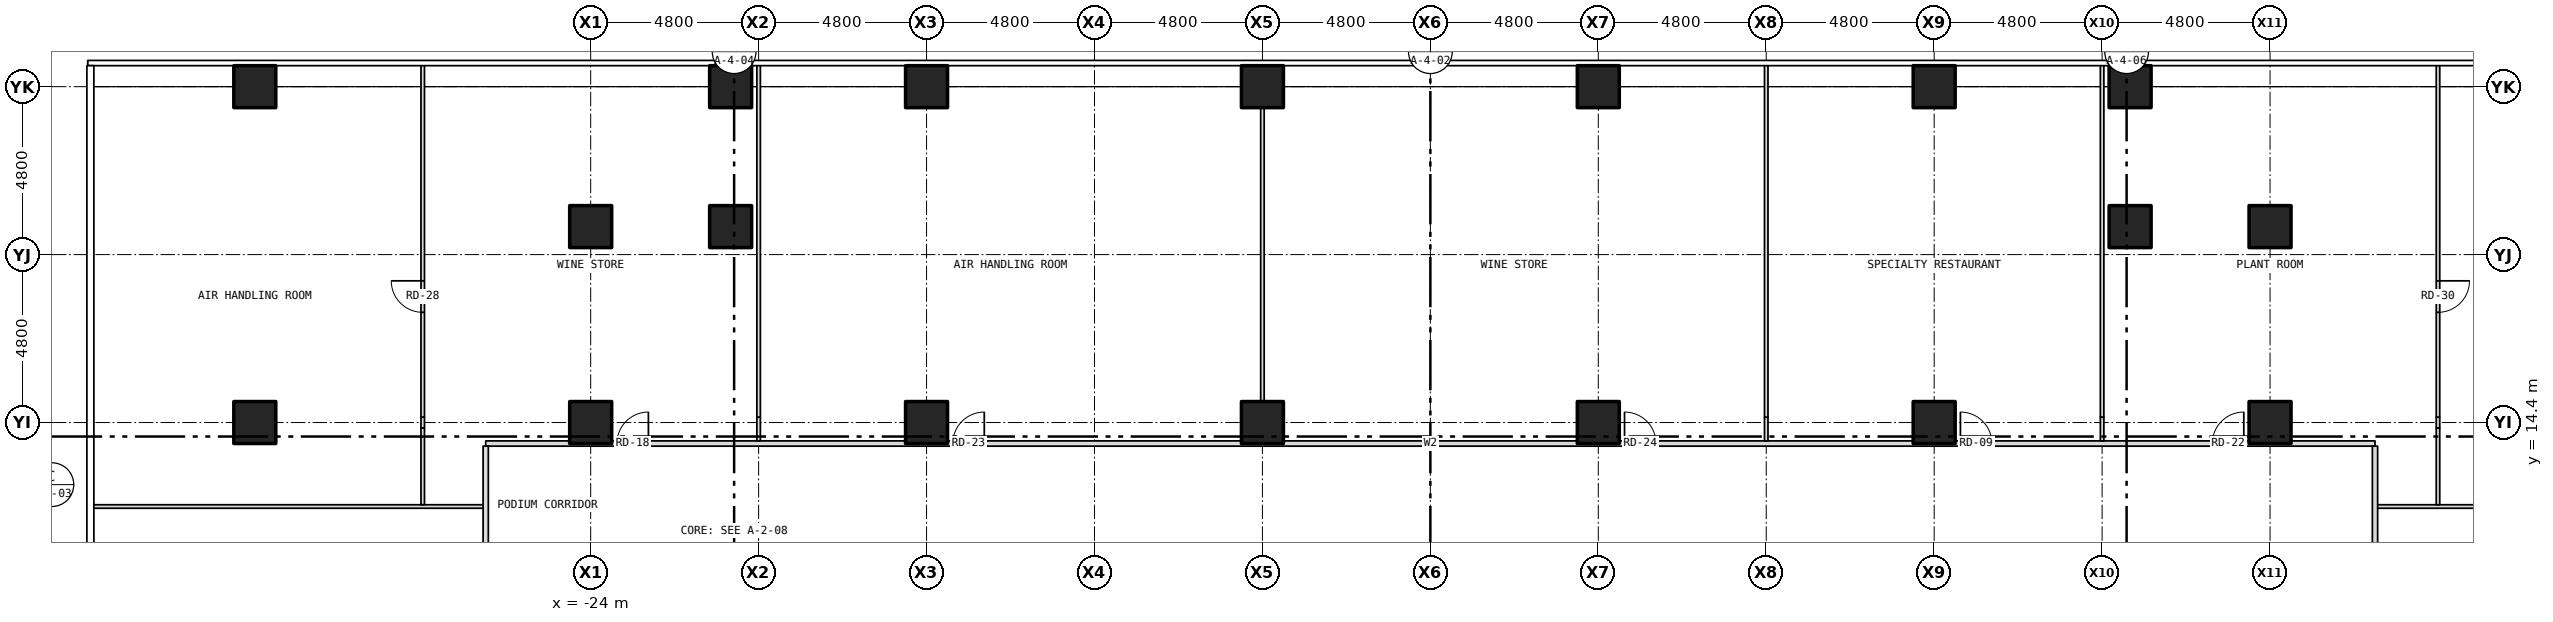
"""IFC4 building model, lengths in metres.
Left out: names, types, materials, properties, quantities, classifications, styles, units other than length and angle.
Written with IfcOpenShell. Run it as: python <this file> out.ifc"""

import sys

from ifc_helpers import new_model, si_unit, direction, frame, frame_2d, origin, origin_2d, place, context, subcontext, project, spatial, rectangle, hollow_rectangle, extrude, element, fill, save


model = new_model("IFC4")
c1 = context("Model", 3, precision=1e-05, world=origin(), true_north=direction((0.0, 1.0)))
c2 = subcontext(c1, "Body", "Model", "MODEL_VIEW")
j1 = project(units=[si_unit("LENGTHUNIT", "METRE"), si_unit("PLANEANGLEUNIT", "RADIAN")], contexts=[c1])
p1 = place(None, origin())
s1 = spatial("IfcSite", under=j1, at=p1, CompositionType="ELEMENT")
p2 = place(p1, origin())
s2 = spatial("IfcBuilding", under=s1, at=p2, CompositionType="ELEMENT")
p3 = place(p2, frame((0.0, 0.0, 29.0)))
s3 = spatial("IfcBuildingStorey", under=s2, at=p3, CompositionType="ELEMENT", Elevation=29.0)
for number, where, z_axis, x_axis in (
    (1, (-33.6, 14.4, -0.2), (0.0, 0.0, 1.0), (1.0, 0.0, 0.0)),
    (2, (-33.6, 24.0, -0.2), (0.0, 0.0, 1.0), (1.0, 0.0, 0.0)),
    (3, (-20.0, 24.0, -0.2), (0.0, 0.0, 1.0), (1.0, 0.0, 0.0)),
    (4, (-14.4, 24.0, -0.2), (0.0, 0.0, 1.0), (1.0, 0.0, 0.0)),
    (5, (-4.8, 24.0, -0.2), (0.0, 0.0, 1.0), (1.0, 0.0, 0.0)),
    (6, (4.8, 24.0, -0.2), (0.0, 0.0, 1.0), (1.0, 0.0, 0.0)),
    (7, (14.4, 24.0, -0.2), (0.0, 0.0, 1.0), (1.0, 0.0, 0.0)),
    (8, (20.0, 24.0, -0.2), (0.0, 0.0, 1.0), (1.0, 0.0, 0.0)),
    (9, (-24.0, 14.4, -0.2), (0.0, 0.0, 1.0), (1.0, 0.0, 0.0)),
    (10, (-24.0, 20.0, -0.2), (0.0, 0.0, 1.0), (1.0, 0.0, 0.0)),
    (11, (-20.0, 20.0, -0.2), (0.0, 0.0, 1.0), (1.0, 0.0, 0.0)),
    (12, (-14.4, 14.4, -0.2), (0.0, 0.0, 1.0), (1.0, 0.0, 0.0)),
    (13, (-4.8, 14.4, -0.2), (0.0, 0.0, 1.0), (1.0, 0.0, 0.0)),
    (14, (4.8, 14.4, -0.2), (0.0, 0.0, 1.0), (1.0, 0.0, 0.0)),
    (15, (14.4, 14.4, -0.2), (0.0, 0.0, 1.0), (1.0, 0.0, 0.0)),
    (16, (20.0, 20.0, -0.2), (0.0, 0.0, 1.0), (1.0, 0.0, 0.0)),
    (17, (24.0, 14.4, -0.2), (0.0, 0.0, 1.0), (1.0, 0.0, 0.0)),
    (18, (24.0, 20.0, -0.2), (0.0, 0.0, 1.0), (1.0, 0.0, 0.0)),
):
    element("IfcColumn", number, at=place(p3, frame(where, z_axis=z_axis, x_axis=x_axis)), inside=s3, PredefinedType="COLUMN", context=c2, shape_type="SweptSolid", body=[
        extrude(hollow_rectangle(XDim=1.2, YDim=1.2, WallThickness=0.07, at=origin_2d()), origin(), (0.0, 0.0, 1.0), 4.4),
    ])
for number, where, z_axis, x_axis in (
    (19, (-38.28, 12.0, 0.0), (0.0, 0.0, 1.0), (1.0, 0.0, 0.0)),
    (20, (27.0, 12.0, 0.0), (0.0, 0.0, 1.0), (1.0, 0.0, 0.0)),
):
    element("IfcWall", number, at=place(p3, frame(where, z_axis=z_axis, x_axis=x_axis)), inside=s3, PredefinedType="PARTITIONING", context=c2, shape_type="SweptSolid", body=[
        extrude(rectangle(XDim=11.28, YDim=0.1, at=frame_2d((5.64, 0.0))), origin(), (0.0, 0.0, 1.0), 4.2),
    ])
p4 = place(p3, frame((-27.0, 13.8, 0.0), z_axis=(0.0, 0.0, 1.0), x_axis=(1.0, 0.0, 0.0)))
e21 = element("IfcWall", 21, at=p4, inside=s3, PredefinedType="PARTITIONING", context=c2, shape_type="SweptSolid", body=[
    extrude(rectangle(XDim=54.0, YDim=0.15, at=frame_2d((27.0, 0.0))), origin(), (0.0, 0.0, 1.0), 4.2),
])
p5 = place(p4, frame((42.15, 0.0, 0.0)))
e22 = element("IfcOpeningElement", 22, at=p5, cuts=e21, PredefinedType="OPENING", context=c2, shape_type="SweptSolid", body=[
    extrude(rectangle(XDim=0.9, YDim=2.1, at=frame_2d((0.45, 1.05))), frame((0.0, 0.087, 0.0), z_axis=(0.0, -1.0, 0.0), x_axis=(1.0, 0.0, 0.0)), (0.0, 0.0, 1.0), 0.174),
])
p6 = place(p4, frame((3.75, 0.0, 0.0)))
e23 = element("IfcOpeningElement", 23, at=p6, cuts=e21, PredefinedType="OPENING", context=c2, shape_type="SweptSolid", body=[
    extrude(rectangle(XDim=0.9, YDim=2.1, at=frame_2d((0.45, 1.05))), frame((0.0, 0.087, 0.0), z_axis=(0.0, -1.0, 0.0), x_axis=(1.0, 0.0, 0.0)), (0.0, 0.0, 1.0), 0.174),
])
p7 = place(p4, frame((49.35, 0.0, 0.0)))
e24 = element("IfcOpeningElement", 24, at=p7, cuts=e21, PredefinedType="OPENING", context=c2, shape_type="SweptSolid", body=[
    extrude(rectangle(XDim=0.9, YDim=2.1, at=frame_2d((0.45, 1.05))), frame((0.0, 0.087, 0.0), z_axis=(0.0, -1.0, 0.0), x_axis=(1.0, 0.0, 0.0)), (0.0, 0.0, 1.0), 0.174),
])
p8 = place(p4, frame((13.35, 0.0, 0.0)))
e25 = element("IfcOpeningElement", 25, at=p8, cuts=e21, PredefinedType="OPENING", context=c2, shape_type="SweptSolid", body=[
    extrude(rectangle(XDim=0.9, YDim=2.1, at=frame_2d((0.45, 1.05))), frame((0.0, 0.087, 0.0), z_axis=(0.0, -1.0, 0.0), x_axis=(1.0, 0.0, 0.0)), (0.0, 0.0, 1.0), 0.174),
])
p9 = place(p4, frame((32.55, 0.0, 0.0)))
e26 = element("IfcOpeningElement", 26, at=p9, cuts=e21, PredefinedType="OPENING", context=c2, shape_type="SweptSolid", body=[
    extrude(rectangle(XDim=0.9, YDim=2.1, at=frame_2d((0.45, 1.05))), frame((0.0, 0.087, 0.0), z_axis=(0.0, -1.0, 0.0), x_axis=(1.0, 0.0, 0.0)), (0.0, 0.0, 1.0), 0.174),
])
p10 = place(p3, frame((-28.8, 12.05, 0.0), z_axis=(0.0, 0.0, 1.0), x_axis=(0.0, 1.0, 0.0)))
e27 = element("IfcWall", 27, at=p10, inside=s3, PredefinedType="PARTITIONING", context=c2, shape_type="SweptSolid", body=[
    extrude(rectangle(XDim=2.196, YDim=0.1, at=frame_2d((1.098, 0.0))), origin(), (0.0, 0.0, 1.0), 3.583),
])
p11 = place(p3, frame((-28.8, 14.246, 0.0), z_axis=(0.0, 0.0, 1.0), x_axis=(0.0, 1.0, 0.0)))
e28 = element("IfcWall", 28, at=p11, inside=s3, PredefinedType="PARTITIONING", context=c2, shape_type="SweptSolid", body=[
    extrude(rectangle(XDim=0.308, YDim=0.1, at=frame_2d((0.154, 0.0))), origin(), (0.0, 0.0, 1.0), 4.2),
])
p12 = place(p3, frame((-28.8, 14.554, 0.0), z_axis=(0.0, 0.0, 1.0), x_axis=(0.0, 1.0, 0.0)))
e29 = element("IfcWall", 29, at=p12, inside=s3, PredefinedType="PARTITIONING", context=c2, shape_type="SweptSolid", body=[
    extrude(rectangle(XDim=10.076, YDim=0.1, at=frame_2d((5.038, 0.0))), origin(), (0.0, 0.0, 1.0), 3.583),
])
p13 = place(p12, frame((2.996, 0.0, 0.0)))
e30 = element("IfcOpeningElement", 30, at=p13, cuts=e29, PredefinedType="OPENING", context=c2, shape_type="SweptSolid", body=[
    extrude(rectangle(XDim=0.9, YDim=2.1, at=frame_2d((0.45, 1.05))), frame((0.0, 0.062, 0.0), z_axis=(0.0, -1.0, 0.0), x_axis=(1.0, 0.0, 0.0)), (0.0, 0.0, 1.0), 0.124),
])
p14 = place(p3, frame((-27.0, -13.725, 0.0), z_axis=(0.0, 0.0, 1.0), x_axis=(0.0, 1.0, 0.0)))
e31 = element("IfcWall", 31, at=p14, inside=s3, PredefinedType="PARTITIONING", context=c2, shape_type="SweptSolid", body=[
    extrude(rectangle(XDim=27.45, YDim=0.15, at=frame_2d((13.725, 0.0))), origin(), (0.0, 0.0, 1.0), 4.2),
])
p15 = place(p14, frame((7.275, 0.0, 0.0)))
e32 = element("IfcOpeningElement", 32, at=p15, cuts=e31, PredefinedType="OPENING", context=c2, shape_type="SweptSolid", body=[
    extrude(rectangle(XDim=0.9, YDim=2.1, at=frame_2d((0.45, 1.05))), frame((0.0, 0.087, 0.0), z_axis=(0.0, -1.0, 0.0), x_axis=(1.0, 0.0, 0.0)), (0.0, 0.0, 1.0), 0.174),
])
p16 = place(p14, frame((19.275, 0.0, 0.0)))
e33 = element("IfcOpeningElement", 33, at=p16, cuts=e31, PredefinedType="OPENING", context=c2, shape_type="SweptSolid", body=[
    extrude(rectangle(XDim=0.9, YDim=2.1, at=frame_2d((0.45, 1.05))), frame((0.0, 0.087, 0.0), z_axis=(0.0, -1.0, 0.0), x_axis=(1.0, 0.0, 0.0)), (0.0, 0.0, 1.0), 0.174),
])
p17 = place(p3, frame((-19.2, 13.875, 0.0), z_axis=(0.0, 0.0, 1.0), x_axis=(0.0, 1.0, 0.0)))
e34 = element("IfcWall", 34, at=p17, inside=s3, PredefinedType="PARTITIONING", context=c2, shape_type="SweptSolid", body=[
    extrude(rectangle(XDim=0.679, YDim=0.1, at=frame_2d((0.339, 0.0))), origin(), (0.0, 0.0, 1.0), 4.2),
])
p18 = place(p3, frame((-19.2, 14.554, 0.0), z_axis=(0.0, 0.0, 1.0), x_axis=(0.0, 1.0, 0.0)))
e35 = element("IfcWall", 35, at=p18, inside=s3, PredefinedType="PARTITIONING", context=c2, shape_type="SweptSolid", body=[
    extrude(rectangle(XDim=10.076, YDim=0.1, at=frame_2d((5.038, 0.0))), origin(), (0.0, 0.0, 1.0), 3.583),
])
p19 = place(p3, frame((-4.8, 13.875, 0.0), z_axis=(0.0, 0.0, 1.0), x_axis=(0.0, 1.0, 0.0)))
e36 = element("IfcWall", 36, at=p19, inside=s3, PredefinedType="PARTITIONING", context=c2, shape_type="SweptSolid", body=[
    extrude(rectangle(XDim=1.125, YDim=0.1, at=frame_2d((0.562, 0.0))), origin(), (0.0, 0.0, 1.0), 4.2),
])
p20 = place(p3, frame((-4.8, 15.0, 0.0), z_axis=(0.0, 0.0, 1.0), x_axis=(0.0, 1.0, 0.0)))
e37 = element("IfcWall", 37, at=p20, inside=s3, PredefinedType="PARTITIONING", context=c2, shape_type="SweptSolid", body=[
    extrude(rectangle(XDim=8.4, YDim=0.1, at=frame_2d((4.2, 0.0))), origin(), (0.0, 0.0, 1.0), 3.273),
])
p21 = place(p3, frame((-4.8, 23.4, 0.0), z_axis=(0.0, 0.0, 1.0), x_axis=(0.0, 1.0, 0.0)))
e38 = element("IfcWall", 38, at=p21, inside=s3, PredefinedType="PARTITIONING", context=c2, shape_type="SweptSolid", body=[
    extrude(rectangle(XDim=0.48, YDim=0.1, at=frame_2d((0.24, 0.0))), origin(), (0.0, 0.0, 1.0), 4.2),
])
p22 = place(p3, frame((9.6, 13.875, 0.0), z_axis=(0.0, 0.0, 1.0), x_axis=(0.0, 1.0, 0.0)))
e39 = element("IfcWall", 39, at=p22, inside=s3, PredefinedType="PARTITIONING", context=c2, shape_type="SweptSolid", body=[
    extrude(rectangle(XDim=0.679, YDim=0.1, at=frame_2d((0.339, 0.0))), origin(), (0.0, 0.0, 1.0), 4.2),
])
p23 = place(p3, frame((9.6, 14.554, 0.0), z_axis=(0.0, 0.0, 1.0), x_axis=(0.0, 1.0, 0.0)))
e40 = element("IfcWall", 40, at=p23, inside=s3, PredefinedType="PARTITIONING", context=c2, shape_type="SweptSolid", body=[
    extrude(rectangle(XDim=10.076, YDim=0.1, at=frame_2d((5.038, 0.0))), origin(), (0.0, 0.0, 1.0), 3.583),
])
p24 = place(p3, frame((19.2, 13.875, 0.0), z_axis=(0.0, 0.0, 1.0), x_axis=(0.0, 1.0, 0.0)))
e41 = element("IfcWall", 41, at=p24, inside=s3, PredefinedType="PARTITIONING", context=c2, shape_type="SweptSolid", body=[
    extrude(rectangle(XDim=0.679, YDim=0.1, at=frame_2d((0.339, 0.0))), origin(), (0.0, 0.0, 1.0), 4.2),
])
p25 = place(p3, frame((19.2, 14.554, 0.0), z_axis=(0.0, 0.0, 1.0), x_axis=(0.0, 1.0, 0.0)))
e42 = element("IfcWall", 42, at=p25, inside=s3, PredefinedType="PARTITIONING", context=c2, shape_type="SweptSolid", body=[
    extrude(rectangle(XDim=10.076, YDim=0.1, at=frame_2d((5.038, 0.0))), origin(), (0.0, 0.0, 1.0), 3.583),
])
p26 = place(p3, frame((27.0, -13.725, 0.0), z_axis=(0.0, 0.0, 1.0), x_axis=(0.0, 1.0, 0.0)))
e43 = element("IfcWall", 43, at=p26, inside=s3, PredefinedType="PARTITIONING", context=c2, shape_type="SweptSolid", body=[
    extrude(rectangle(XDim=27.45, YDim=0.15, at=frame_2d((13.725, 0.0))), origin(), (0.0, 0.0, 1.0), 4.2),
])
p27 = place(p26, frame((7.275, 0.0, 0.0)))
e44 = element("IfcOpeningElement", 44, at=p27, cuts=e43, PredefinedType="OPENING", context=c2, shape_type="SweptSolid", body=[
    extrude(rectangle(XDim=0.9, YDim=2.1, at=frame_2d((0.45, 1.05))), frame((0.0, 0.087, 0.0), z_axis=(0.0, -1.0, 0.0), x_axis=(1.0, 0.0, 0.0)), (0.0, 0.0, 1.0), 0.174),
])
p28 = place(p26, frame((19.275, 0.0, 0.0)))
e45 = element("IfcOpeningElement", 45, at=p28, cuts=e43, PredefinedType="OPENING", context=c2, shape_type="SweptSolid", body=[
    extrude(rectangle(XDim=0.9, YDim=2.1, at=frame_2d((0.45, 1.05))), frame((0.0, 0.087, 0.0), z_axis=(0.0, -1.0, 0.0), x_axis=(1.0, 0.0, 0.0)), (0.0, 0.0, 1.0), 0.174),
])
p29 = place(p3, frame((28.8, 12.05, 0.0), z_axis=(0.0, 0.0, 1.0), x_axis=(0.0, 1.0, 0.0)))
e46 = element("IfcWall", 46, at=p29, inside=s3, PredefinedType="PARTITIONING", context=c2, shape_type="SweptSolid", body=[
    extrude(rectangle(XDim=2.196, YDim=0.1, at=frame_2d((1.098, 0.0))), origin(), (0.0, 0.0, 1.0), 3.583),
])
p30 = place(p3, frame((28.8, 14.246, 0.0), z_axis=(0.0, 0.0, 1.0), x_axis=(0.0, 1.0, 0.0)))
e47 = element("IfcWall", 47, at=p30, inside=s3, PredefinedType="PARTITIONING", context=c2, shape_type="SweptSolid", body=[
    extrude(rectangle(XDim=0.308, YDim=0.1, at=frame_2d((0.154, 0.0))), origin(), (0.0, 0.0, 1.0), 4.2),
])
p31 = place(p3, frame((28.8, 14.554, 0.0), z_axis=(0.0, 0.0, 1.0), x_axis=(0.0, 1.0, 0.0)))
e48 = element("IfcWall", 48, at=p31, inside=s3, PredefinedType="PARTITIONING", context=c2, shape_type="SweptSolid", body=[
    extrude(rectangle(XDim=10.076, YDim=0.1, at=frame_2d((5.038, 0.0))), origin(), (0.0, 0.0, 1.0), 3.583),
])
p32 = place(p31, frame((2.996, 0.0, 0.0)))
e49 = element("IfcOpeningElement", 49, at=p32, cuts=e48, PredefinedType="OPENING", context=c2, shape_type="SweptSolid", body=[
    extrude(rectangle(XDim=0.9, YDim=2.1, at=frame_2d((0.45, 1.05))), frame((0.0, 0.062, 0.0), z_axis=(0.0, -1.0, 0.0), x_axis=(1.0, 0.0, 0.0)), (0.0, 0.0, 1.0), 0.124),
])
p33 = place(p5, origin())
e50 = element("IfcDoor", 50, at=p33, inside=s3, OperationType="SINGLE_SWING_LEFT", PredefinedType="DOOR", context=c2, shape_type="SweptSolid", body=[
    extrude(rectangle(XDim=0.9, YDim=2.1, at=frame_2d((0.45, 1.05))), frame((0.0, 0.025, 0.0), z_axis=(0.0, -1.0, 0.0), x_axis=(1.0, 0.0, 0.0)), (0.0, 0.0, 1.0), 0.05),
])
fill(e22, e50)
p34 = place(p6, origin())
e51 = element("IfcDoor", 51, at=p34, inside=s3, OperationType="SINGLE_SWING_RIGHT", PredefinedType="DOOR", context=c2, shape_type="SweptSolid", body=[
    extrude(rectangle(XDim=0.9, YDim=2.1, at=frame_2d((0.45, 1.05))), frame((0.0, 0.025, 0.0), z_axis=(0.0, -1.0, 0.0), x_axis=(1.0, 0.0, 0.0)), (0.0, 0.0, 1.0), 0.05),
])
fill(e23, e51)
p35 = place(p7, origin())
e52 = element("IfcDoor", 52, at=p35, inside=s3, OperationType="SINGLE_SWING_RIGHT", PredefinedType="DOOR", context=c2, shape_type="SweptSolid", body=[
    extrude(rectangle(XDim=0.9, YDim=2.1, at=frame_2d((0.45, 1.05))), frame((0.0, 0.025, 0.0), z_axis=(0.0, -1.0, 0.0), x_axis=(1.0, 0.0, 0.0)), (0.0, 0.0, 1.0), 0.05),
])
fill(e24, e52)
p36 = place(p8, origin())
e53 = element("IfcDoor", 53, at=p36, inside=s3, OperationType="SINGLE_SWING_RIGHT", PredefinedType="DOOR", context=c2, shape_type="SweptSolid", body=[
    extrude(rectangle(XDim=0.9, YDim=2.1, at=frame_2d((0.45, 1.05))), frame((0.0, 0.025, 0.0), z_axis=(0.0, -1.0, 0.0), x_axis=(1.0, 0.0, 0.0)), (0.0, 0.0, 1.0), 0.05),
])
fill(e25, e53)
p37 = place(p9, origin())
e54 = element("IfcDoor", 54, at=p37, inside=s3, OperationType="SINGLE_SWING_LEFT", PredefinedType="DOOR", context=c2, shape_type="SweptSolid", body=[
    extrude(rectangle(XDim=0.9, YDim=2.1, at=frame_2d((0.45, 1.05))), frame((0.0, 0.025, 0.0), z_axis=(0.0, -1.0, 0.0), x_axis=(1.0, 0.0, 0.0)), (0.0, 0.0, 1.0), 0.05),
])
fill(e26, e54)
p38 = place(p13, origin())
e55 = element("IfcDoor", 55, at=p38, inside=s3, OperationType="SINGLE_SWING_RIGHT", PredefinedType="DOOR", context=c2, shape_type="SweptSolid", body=[
    extrude(rectangle(XDim=0.9, YDim=2.1, at=frame_2d((0.45, 1.05))), frame((0.0, 0.025, 0.0), z_axis=(0.0, -1.0, 0.0), x_axis=(1.0, 0.0, 0.0)), (0.0, 0.0, 1.0), 0.05),
])
fill(e30, e55)
p39 = place(p32, origin())
e56 = element("IfcDoor", 56, at=p39, inside=s3, OperationType="SINGLE_SWING_RIGHT", PredefinedType="DOOR", context=c2, shape_type="SweptSolid", body=[
    extrude(rectangle(XDim=0.9, YDim=2.1, at=frame_2d((0.45, 1.05))), frame((0.0, 0.025, 0.0), z_axis=(0.0, -1.0, 0.0), x_axis=(1.0, 0.0, 0.0)), (0.0, 0.0, 1.0), 0.05),
])
fill(e49, e56)
save(model, sys.argv[1])
